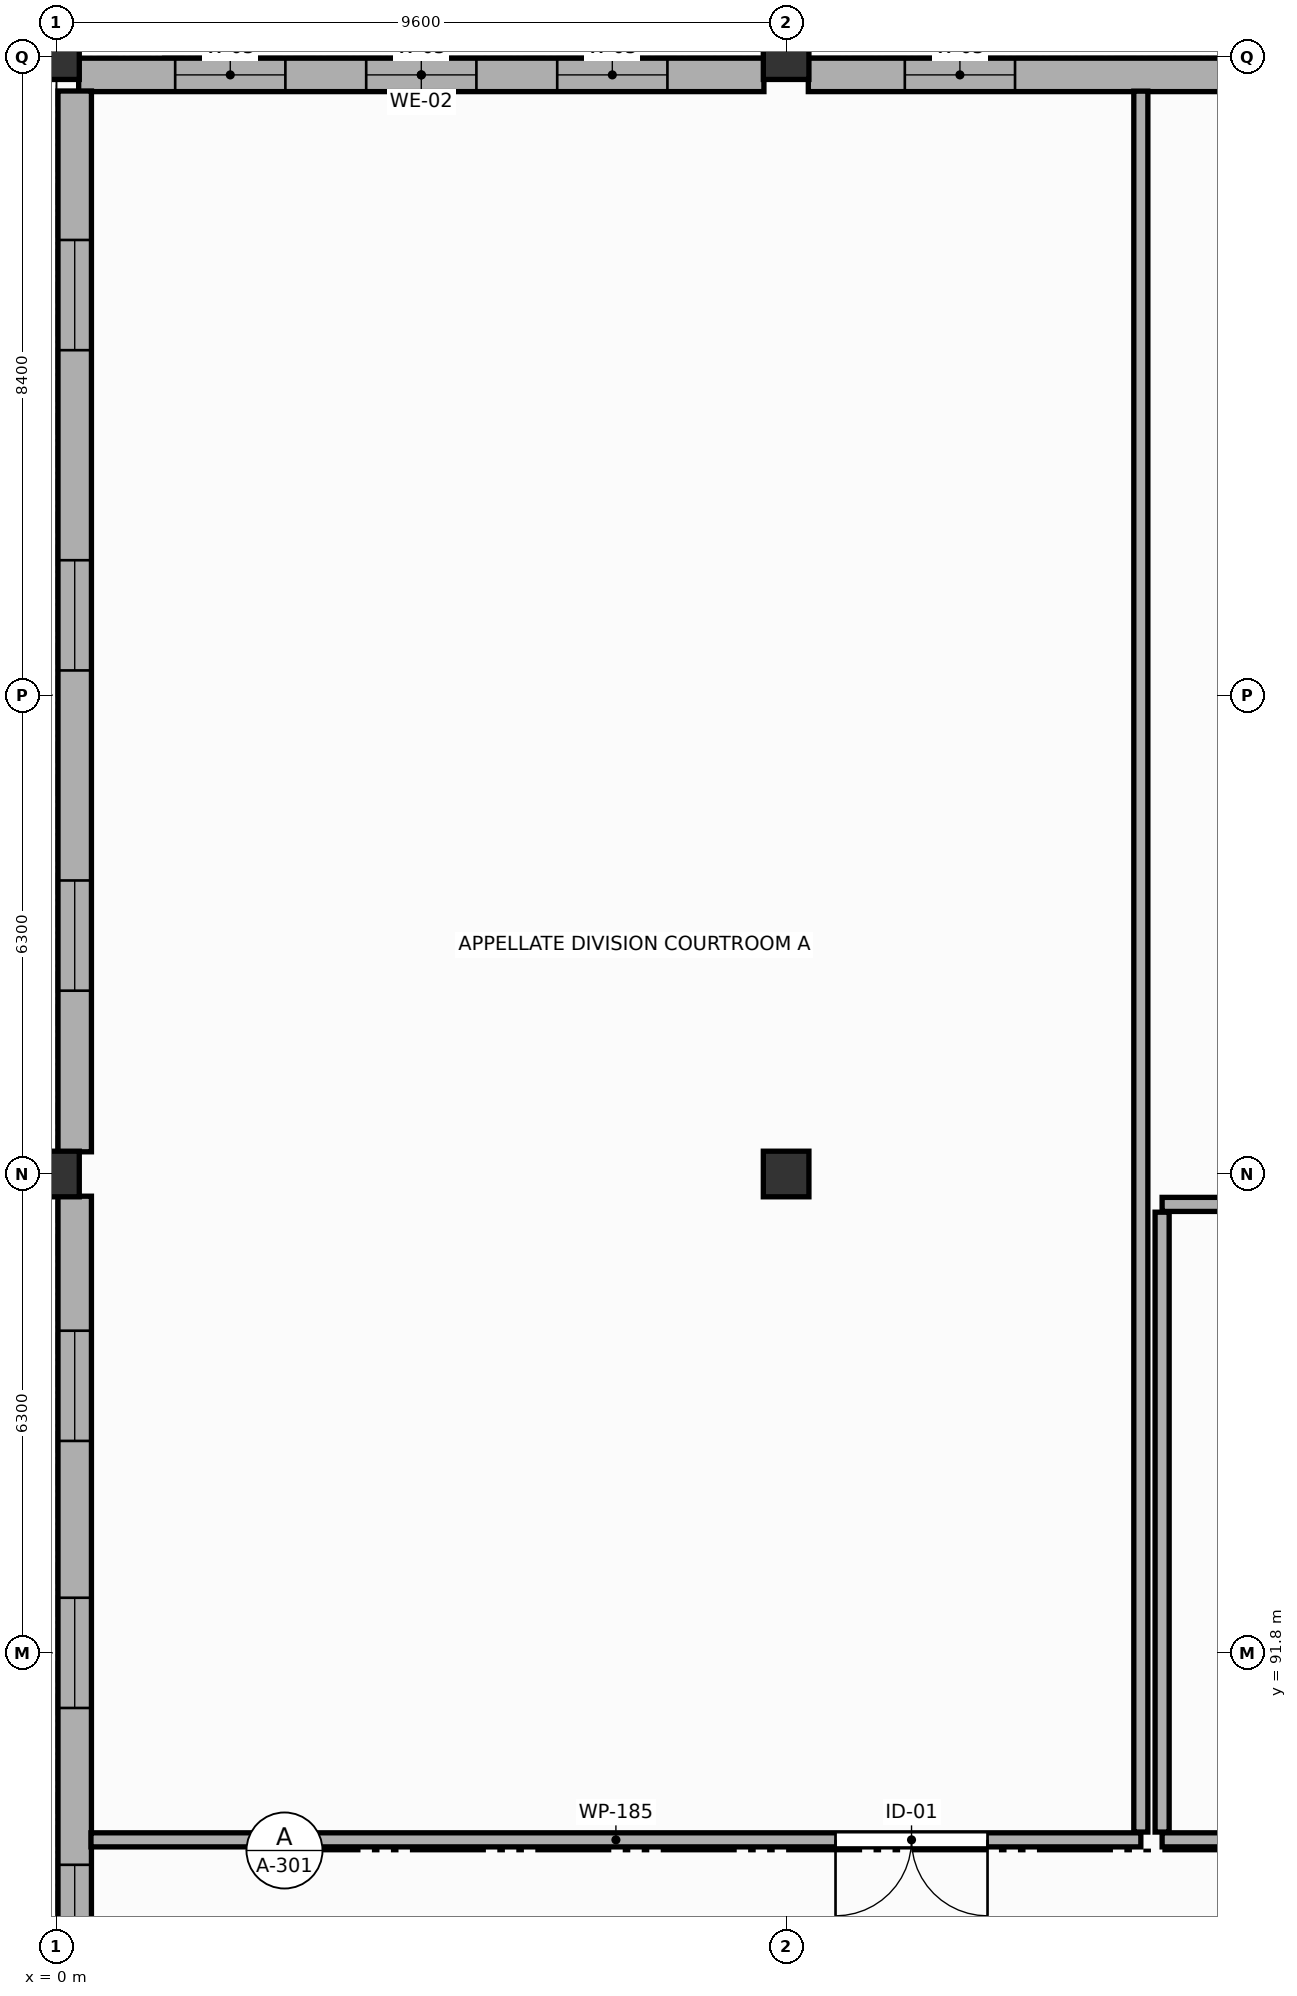
"""IFC4 building model, lengths in metres.
Left out: names, types, materials, properties, quantities, classifications, styles, units other than length and angle.
Written with IfcOpenShell. Run it as: python <this file> out.ifc"""

import sys

from ifc_helpers import new_model, si_unit, direction, frame, frame_2d, origin, origin_2d, place, context, subcontext, project, spatial, rectangle, extrude, element, fill, save


model = new_model("IFC4")
c1 = context("Model", 3, precision=1e-05, world=origin(), true_north=direction((0.0, 1.0)))
c2 = subcontext(c1, "Body", "Model", "MODEL_VIEW")
j1 = project(units=[si_unit("LENGTHUNIT", "METRE"), si_unit("PLANEANGLEUNIT", "RADIAN")], contexts=[c1])
p1 = place(None, origin())
s1 = spatial("IfcSite", under=j1, at=p1, CompositionType="ELEMENT")
p2 = place(p1, origin())
s2 = spatial("IfcBuilding", under=s1, at=p2, CompositionType="ELEMENT")
p3 = place(p2, frame((0.0, 0.0, 18.6)))
s3 = spatial("IfcBuildingStorey", under=s2, at=p3, CompositionType="ELEMENT", Elevation=18.6)
for number, where, z_axis, x_axis in (
    (1, (0.0, 98.1, 0.0), (0.0, 0.0, 1.0), (1.0, 0.0, 0.0)),
    (2, (0.0, 112.8, 0.0), (0.0, 0.0, 1.0), (1.0, 0.0, 0.0)),
    (3, (9.6, 98.1, 0.0), (0.0, 0.0, 1.0), (1.0, 0.0, 0.0)),
    (4, (9.6, 112.8, 0.0), (0.0, 0.0, 1.0), (1.0, 0.0, 0.0)),
):
    element("IfcColumn", number, at=place(p3, frame(where, z_axis=z_axis, x_axis=x_axis)), inside=s3, PredefinedType="COLUMN", context=c2, shape_type="SweptSolid", body=[
        extrude(rectangle(XDim=0.6, YDim=0.6, at=origin_2d()), origin(), (0.0, 0.0, 1.0), 4.2),
    ])
p4 = place(p3, frame((0.292, 112.56, 0.0), z_axis=(0.0, 0.0, 1.0), x_axis=(1.0, 0.0, 0.0)))
e5 = element("IfcWall", 5, at=p4, inside=s3, PredefinedType="STANDARD", context=c2, shape_type="SweptSolid", body=[
    extrude(rectangle(XDim=9.016, YDim=0.44, at=frame_2d((4.508, 0.0))), origin(), (0.0, 0.0, 1.0), 3.04),
])
p5 = place(p4, frame((1.27, 0.0, 0.77)))
e6 = element("IfcOpeningElement", 6, at=p5, cuts=e5, PredefinedType="OPENING", context=c2, shape_type="SweptSolid", body=[
    extrude(rectangle(XDim=1.45, YDim=2.05, at=frame_2d((0.725, 1.025))), frame((0.0, 0.23, 0.0), z_axis=(0.0, -1.0, 0.0), x_axis=(1.0, 0.0, 0.0)), (0.0, 0.0, 1.0), 0.46),
])
p6 = place(p4, frame((3.783, 0.0, 0.77)))
e7 = element("IfcOpeningElement", 7, at=p6, cuts=e5, PredefinedType="OPENING", context=c2, shape_type="SweptSolid", body=[
    extrude(rectangle(XDim=1.45, YDim=2.05, at=frame_2d((0.725, 1.025))), frame((0.0, 0.23, 0.0), z_axis=(0.0, -1.0, 0.0), x_axis=(1.0, 0.0, 0.0)), (0.0, 0.0, 1.0), 0.46),
])
p7 = place(p4, frame((6.296, 0.0, 0.77)))
e8 = element("IfcOpeningElement", 8, at=p7, cuts=e5, PredefinedType="OPENING", context=c2, shape_type="SweptSolid", body=[
    extrude(rectangle(XDim=1.45, YDim=2.05, at=frame_2d((0.725, 1.025))), frame((0.0, 0.23, 0.0), z_axis=(0.0, -1.0, 0.0), x_axis=(1.0, 0.0, 0.0)), (0.0, 0.0, 1.0), 0.46),
])
p8 = place(p3, frame((9.892, 112.56, 0.0), z_axis=(0.0, 0.0, 1.0), x_axis=(1.0, 0.0, 0.0)))
e9 = element("IfcWall", 9, at=p8, inside=s3, PredefinedType="STANDARD", context=c2, shape_type="SweptSolid", body=[
    extrude(rectangle(XDim=9.016, YDim=0.44, at=frame_2d((4.508, 0.0))), origin(), (0.0, 0.0, 1.0), 3.04),
])
p9 = place(p8, frame((1.27, 0.0, 0.77)))
e10 = element("IfcOpeningElement", 10, at=p9, cuts=e9, PredefinedType="OPENING", context=c2, shape_type="SweptSolid", body=[
    extrude(rectangle(XDim=1.45, YDim=2.05, at=frame_2d((0.725, 1.025))), frame((0.0, 0.23, 0.0), z_axis=(0.0, -1.0, 0.0), x_axis=(1.0, 0.0, 0.0)), (0.0, 0.0, 1.0), 0.46),
])
p10 = place(p8, frame((6.296, 0.0, 0.77)))
e11 = element("IfcOpeningElement", 11, at=p10, cuts=e9, PredefinedType="OPENING", context=c2, shape_type="SweptSolid", body=[
    extrude(rectangle(XDim=1.45, YDim=2.05, at=frame_2d((0.725, 1.025))), frame((0.0, 0.23, 0.0), z_axis=(0.0, -1.0, 0.0), x_axis=(1.0, 0.0, 0.0)), (0.0, 0.0, 1.0), 0.46),
])
p11 = place(p3, frame((0.24, 85.792, 0.0), z_axis=(0.0, 0.0, 1.0), x_axis=(0.0, 1.0, 0.0)))
e12 = element("IfcWall", 12, at=p11, inside=s3, PredefinedType="STANDARD", context=c2, shape_type="SweptSolid", body=[
    extrude(rectangle(XDim=12.016, YDim=0.44, at=frame_2d((6.008, 0.0))), origin(), (0.0, 0.0, 1.0), 3.04),
])
p12 = place(p11, frame((1.77, 0.0, 0.77)))
e13 = element("IfcOpeningElement", 13, at=p12, cuts=e12, PredefinedType="OPENING", context=c2, shape_type="SweptSolid", body=[
    extrude(rectangle(XDim=1.45, YDim=2.05, at=frame_2d((0.725, 1.025))), frame((0.0, 0.23, 0.0), z_axis=(0.0, -1.0, 0.0), x_axis=(1.0, 0.0, 0.0)), (0.0, 0.0, 1.0), 0.46),
])
p13 = place(p11, frame((5.283, 0.0, 0.77)))
e14 = element("IfcOpeningElement", 14, at=p13, cuts=e12, PredefinedType="OPENING", context=c2, shape_type="SweptSolid", body=[
    extrude(rectangle(XDim=1.45, YDim=2.05, at=frame_2d((0.725, 1.025))), frame((0.0, 0.23, 0.0), z_axis=(0.0, -1.0, 0.0), x_axis=(1.0, 0.0, 0.0)), (0.0, 0.0, 1.0), 0.46),
])
p14 = place(p11, frame((8.796, 0.0, 0.77)))
e15 = element("IfcOpeningElement", 15, at=p14, cuts=e12, PredefinedType="OPENING", context=c2, shape_type="SweptSolid", body=[
    extrude(rectangle(XDim=1.45, YDim=2.05, at=frame_2d((0.725, 1.025))), frame((0.0, 0.23, 0.0), z_axis=(0.0, -1.0, 0.0), x_axis=(1.0, 0.0, 0.0)), (0.0, 0.0, 1.0), 0.46),
])
p15 = place(p3, frame((0.24, 98.392, 0.0), z_axis=(0.0, 0.0, 1.0), x_axis=(0.0, 1.0, 0.0)))
e16 = element("IfcWall", 16, at=p15, inside=s3, PredefinedType="STANDARD", context=c2, shape_type="SweptSolid", body=[
    extrude(rectangle(XDim=13.956, YDim=0.44, at=frame_2d((6.978, 0.0))), origin(), (0.0, 0.0, 1.0), 3.04),
])
p16 = place(p15, frame((2.12, 0.0, 0.77)))
e17 = element("IfcOpeningElement", 17, at=p16, cuts=e16, PredefinedType="OPENING", context=c2, shape_type="SweptSolid", body=[
    extrude(rectangle(XDim=1.45, YDim=2.05, at=frame_2d((0.725, 1.025))), frame((0.0, 0.23, 0.0), z_axis=(0.0, -1.0, 0.0), x_axis=(1.0, 0.0, 0.0)), (0.0, 0.0, 1.0), 0.46),
])
p17 = place(p15, frame((6.333, 0.0, 0.77)))
e18 = element("IfcOpeningElement", 18, at=p17, cuts=e16, PredefinedType="OPENING", context=c2, shape_type="SweptSolid", body=[
    extrude(rectangle(XDim=1.45, YDim=2.05, at=frame_2d((0.725, 1.025))), frame((0.0, 0.23, 0.0), z_axis=(0.0, -1.0, 0.0), x_axis=(1.0, 0.0, 0.0)), (0.0, 0.0, 1.0), 0.46),
])
p18 = place(p15, frame((10.546, 0.0, 0.77)))
e19 = element("IfcOpeningElement", 19, at=p18, cuts=e16, PredefinedType="OPENING", context=c2, shape_type="SweptSolid", body=[
    extrude(rectangle(XDim=1.45, YDim=2.05, at=frame_2d((0.725, 1.025))), frame((0.0, 0.23, 0.0), z_axis=(0.0, -1.0, 0.0), x_axis=(1.0, 0.0, 0.0)), (0.0, 0.0, 1.0), 0.46),
])
p19 = place(p3, frame((14.267, 89.34, 0.0), z_axis=(0.0, 0.0, 1.0), x_axis=(-1.0, 0.0, 0.0)))
e20 = element("IfcWall", 20, at=p19, inside=s3, PredefinedType="PARTITIONING", context=c2, shape_type="SweptSolid", body=[
    extrude(rectangle(XDim=13.813, YDim=0.185, at=frame_2d((6.906, 0.0))), origin(), (0.0, 0.0, 1.0), 3.09),
])
p20 = place(p19, frame((2.017, 0.0, 0.0)))
e21 = element("IfcOpeningElement", 21, at=p20, cuts=e20, PredefinedType="OPENING", context=c2, shape_type="SweptSolid", body=[
    extrude(rectangle(XDim=2.0, YDim=2.5, at=frame_2d((1.0, 1.25))), frame((0.0, 0.103, 0.0), z_axis=(0.0, -1.0, 0.0), x_axis=(1.0, 0.0, 0.0)), (0.0, 0.0, 1.0), 0.205),
])
p21 = place(p3, frame((14.267, 112.346, 0.0), z_axis=(0.0, 0.0, 1.0), x_axis=(0.0, -1.0, 0.0)))
e22 = element("IfcWall", 22, at=p21, inside=s3, PredefinedType="PARTITIONING", context=c2, shape_type="SweptSolid", body=[
    extrude(rectangle(XDim=22.904, YDim=0.185, at=frame_2d((11.452, 0.0))), origin(), (0.0, 0.0, 1.0), 3.29),
])
p22 = place(p3, frame((14.547, 97.7, 0.0), z_axis=(0.0, 0.0, 1.0), x_axis=(1.0, 0.0, 0.0)))
e23 = element("IfcWall", 23, at=p22, inside=s3, PredefinedType="PARTITIONING", context=c2, shape_type="SweptSolid", body=[
    extrude(rectangle(XDim=11.513, YDim=0.185, at=frame_2d((5.756, 0.0))), origin(), (0.0, 0.0, 1.0), 3.04),
])
p23 = place(p3, frame((26.06, 89.34, 0.0), z_axis=(0.0, 0.0, 1.0), x_axis=(-1.0, 0.0, 0.0)))
e24 = element("IfcWall", 24, at=p23, inside=s3, PredefinedType="PARTITIONING", context=c2, shape_type="SweptSolid", body=[
    extrude(rectangle(XDim=11.513, YDim=0.185, at=frame_2d((5.756, 0.0))), origin(), (0.0, 0.0, 1.0), 3.09),
])
p24 = place(p23, frame((2.113, 0.0, 0.0)))
e25 = element("IfcOpeningElement", 25, at=p24, cuts=e24, PredefinedType="OPENING", context=c2, shape_type="SweptSolid", body=[
    extrude(rectangle(XDim=2.0, YDim=2.5, at=frame_2d((1.0, 1.25))), frame((0.0, 0.103, 0.0), z_axis=(0.0, -1.0, 0.0), x_axis=(1.0, 0.0, 0.0)), (0.0, 0.0, 1.0), 0.205),
])
p25 = place(p3, frame((14.547, 89.442, 0.0), z_axis=(0.0, 0.0, 1.0), x_axis=(0.0, 1.0, 0.0)))
e26 = element("IfcWall", 26, at=p25, inside=s3, PredefinedType="PARTITIONING", context=c2, shape_type="SweptSolid", body=[
    extrude(rectangle(XDim=8.155, YDim=0.185, at=frame_2d((4.078, 0.0))), origin(), (0.0, 0.0, 1.0), 3.34),
])
p26 = place(p5, origin())
e27 = element("IfcWindow", 27, at=p26, inside=s3, PartitioningType="SINGLE_PANEL", PredefinedType="WINDOW", context=c2, shape_type="SweptSolid", body=[
    extrude(rectangle(XDim=1.45, YDim=2.05, at=frame_2d((0.725, 1.025))), frame((0.0, 0.03, 0.0), z_axis=(0.0, -1.0, 0.0), x_axis=(1.0, 0.0, 0.0)), (0.0, 0.0, 1.0), 0.06),
])
fill(e6, e27)
p27 = place(p6, origin())
e28 = element("IfcWindow", 28, at=p27, inside=s3, PartitioningType="SINGLE_PANEL", PredefinedType="WINDOW", context=c2, shape_type="SweptSolid", body=[
    extrude(rectangle(XDim=1.45, YDim=2.05, at=frame_2d((0.725, 1.025))), frame((0.0, 0.03, 0.0), z_axis=(0.0, -1.0, 0.0), x_axis=(1.0, 0.0, 0.0)), (0.0, 0.0, 1.0), 0.06),
])
fill(e7, e28)
p28 = place(p7, origin())
e29 = element("IfcWindow", 29, at=p28, inside=s3, PartitioningType="SINGLE_PANEL", PredefinedType="WINDOW", context=c2, shape_type="SweptSolid", body=[
    extrude(rectangle(XDim=1.45, YDim=2.05, at=frame_2d((0.725, 1.025))), frame((0.0, 0.03, 0.0), z_axis=(0.0, -1.0, 0.0), x_axis=(1.0, 0.0, 0.0)), (0.0, 0.0, 1.0), 0.06),
])
fill(e8, e29)
p29 = place(p9, origin())
e30 = element("IfcWindow", 30, at=p29, inside=s3, PartitioningType="SINGLE_PANEL", PredefinedType="WINDOW", context=c2, shape_type="SweptSolid", body=[
    extrude(rectangle(XDim=1.45, YDim=2.05, at=frame_2d((0.725, 1.025))), frame((0.0, 0.03, 0.0), z_axis=(0.0, -1.0, 0.0), x_axis=(1.0, 0.0, 0.0)), (0.0, 0.0, 1.0), 0.06),
])
fill(e10, e30)
p30 = place(p12, origin())
e31 = element("IfcWindow", 31, at=p30, inside=s3, PartitioningType="SINGLE_PANEL", PredefinedType="WINDOW", context=c2, shape_type="SweptSolid", body=[
    extrude(rectangle(XDim=1.45, YDim=2.05, at=frame_2d((0.725, 1.025))), frame((0.0, 0.03, 0.0), z_axis=(0.0, -1.0, 0.0), x_axis=(1.0, 0.0, 0.0)), (0.0, 0.0, 1.0), 0.06),
])
fill(e13, e31)
p31 = place(p13, origin())
e32 = element("IfcWindow", 32, at=p31, inside=s3, PartitioningType="SINGLE_PANEL", PredefinedType="WINDOW", context=c2, shape_type="SweptSolid", body=[
    extrude(rectangle(XDim=1.45, YDim=2.05, at=frame_2d((0.725, 1.025))), frame((0.0, 0.03, 0.0), z_axis=(0.0, -1.0, 0.0), x_axis=(1.0, 0.0, 0.0)), (0.0, 0.0, 1.0), 0.06),
])
fill(e14, e32)
p32 = place(p14, origin())
e33 = element("IfcWindow", 33, at=p32, inside=s3, PartitioningType="SINGLE_PANEL", PredefinedType="WINDOW", context=c2, shape_type="SweptSolid", body=[
    extrude(rectangle(XDim=1.45, YDim=2.05, at=frame_2d((0.725, 1.025))), frame((0.0, 0.03, 0.0), z_axis=(0.0, -1.0, 0.0), x_axis=(1.0, 0.0, 0.0)), (0.0, 0.0, 1.0), 0.06),
])
fill(e15, e33)
p33 = place(p16, origin())
e34 = element("IfcWindow", 34, at=p33, inside=s3, PartitioningType="SINGLE_PANEL", PredefinedType="WINDOW", context=c2, shape_type="SweptSolid", body=[
    extrude(rectangle(XDim=1.45, YDim=2.05, at=frame_2d((0.725, 1.025))), frame((0.0, 0.03, 0.0), z_axis=(0.0, -1.0, 0.0), x_axis=(1.0, 0.0, 0.0)), (0.0, 0.0, 1.0), 0.06),
])
fill(e17, e34)
p34 = place(p17, origin())
e35 = element("IfcWindow", 35, at=p34, inside=s3, PartitioningType="SINGLE_PANEL", PredefinedType="WINDOW", context=c2, shape_type="SweptSolid", body=[
    extrude(rectangle(XDim=1.45, YDim=2.05, at=frame_2d((0.725, 1.025))), frame((0.0, 0.03, 0.0), z_axis=(0.0, -1.0, 0.0), x_axis=(1.0, 0.0, 0.0)), (0.0, 0.0, 1.0), 0.06),
])
fill(e18, e35)
p35 = place(p18, origin())
e36 = element("IfcWindow", 36, at=p35, inside=s3, PartitioningType="SINGLE_PANEL", PredefinedType="WINDOW", context=c2, shape_type="SweptSolid", body=[
    extrude(rectangle(XDim=1.45, YDim=2.05, at=frame_2d((0.725, 1.025))), frame((0.0, 0.03, 0.0), z_axis=(0.0, -1.0, 0.0), x_axis=(1.0, 0.0, 0.0)), (0.0, 0.0, 1.0), 0.06),
])
fill(e19, e36)
p36 = place(p20, origin())
e37 = element("IfcDoor", 37, at=p36, inside=s3, OperationType="DOUBLE_DOOR_SINGLE_SWING", PredefinedType="DOOR", context=c2, shape_type="SweptSolid", body=[
    extrude(rectangle(XDim=2.0, YDim=2.5, at=frame_2d((1.0, 1.25))), frame((0.0, 0.025, 0.0), z_axis=(0.0, -1.0, 0.0), x_axis=(1.0, 0.0, 0.0)), (0.0, 0.0, 1.0), 0.05),
])
fill(e21, e37)
save(model, sys.argv[1])
